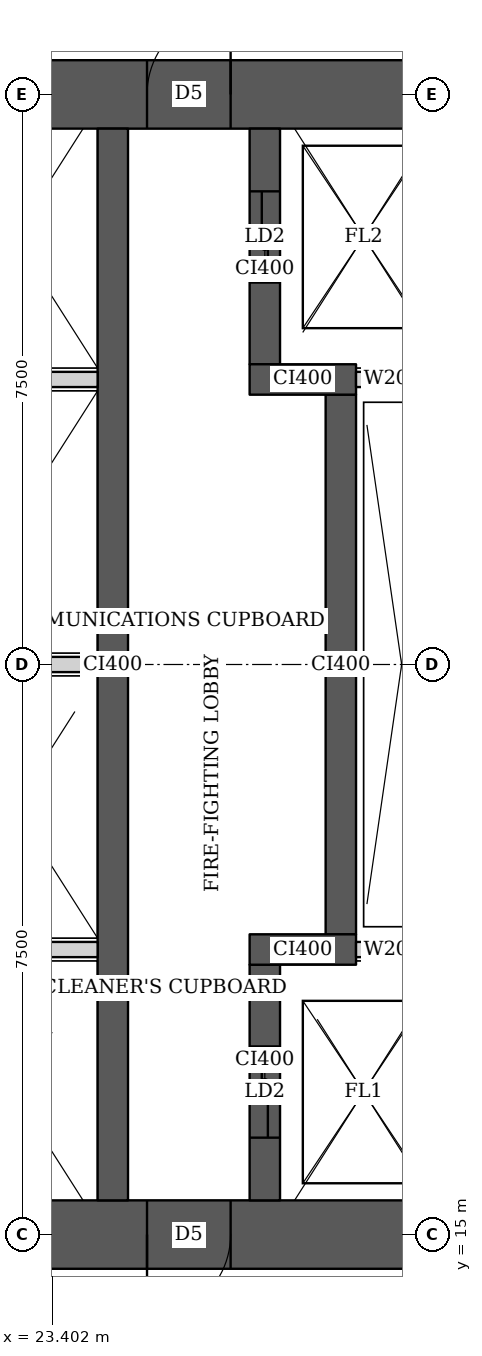
"""IFC4 building model, lengths in metres.
Left out: names, types, materials, properties, quantities, classifications, styles, units other than length and angle.
Written with IfcOpenShell. Run it as: python <this file> out.ifc"""

import sys

from ifc_helpers import new_model, si_unit, direction, frame, frame_2d, origin, place, context, subcontext, project, spatial, rectangle, extrude, element, fill, save


model = new_model("IFC4")
c1 = context("Model", 3, precision=1e-05, world=origin(), true_north=direction((0.0, 1.0)))
c2 = subcontext(c1, "Body", "Model", "MODEL_VIEW")
j1 = project(units=[si_unit("LENGTHUNIT", "METRE"), si_unit("PLANEANGLEUNIT", "RADIAN")], contexts=[c1])
p1 = place(None, origin())
s1 = spatial("IfcSite", under=j1, at=p1, CompositionType="ELEMENT")
p2 = place(p1, origin())
s2 = spatial("IfcBuilding", under=s1, at=p2, CompositionType="ELEMENT")
p3 = place(p2, frame((0.0, 0.0, 5.6)))
s3 = spatial("IfcBuildingStorey", under=s2, at=p3, CompositionType="ELEMENT", Elevation=5.6)
p4 = place(p3, frame((13.95, 15.0, 0.0), z_axis=(0.0, 0.0, 1.0), x_axis=(1.0, 0.0, 0.0)))
e1 = element("IfcWall", 1, at=p4, inside=s3, PredefinedType="SHEAR", context=c2, shape_type="SweptSolid", body=[
    extrude(rectangle(XDim=15.3, YDim=0.9, at=frame_2d((7.65, 0.0))), origin(), (0.0, 0.0, 1.0), 4.5),
])
p5 = place(p4, frame((4.45, 0.0, 0.0)))
e2 = element("IfcOpeningElement", 2, at=p5, cuts=e1, PredefinedType="OPENING", context=c2, shape_type="SweptSolid", body=[
    extrude(rectangle(XDim=1.8, YDim=2.1, at=frame_2d((0.9, 1.05))), frame((0.0, 0.46, 0.0), z_axis=(0.0, -1.0, 0.0), x_axis=(1.0, 0.0, 0.0)), (0.0, 0.0, 1.0), 0.92),
])
p6 = place(p4, frame((10.7, 0.0, 0.0)))
e3 = element("IfcOpeningElement", 3, at=p6, cuts=e1, PredefinedType="OPENING", context=c2, shape_type="SweptSolid", body=[
    extrude(rectangle(XDim=1.1, YDim=2.1, at=frame_2d((0.55, 1.05))), frame((0.0, 0.46, 0.0), z_axis=(0.0, -1.0, 0.0), x_axis=(1.0, 0.0, 0.0)), (0.0, 0.0, 1.0), 0.92),
])
p7 = place(p3, frame((13.95, 30.0, 0.0), z_axis=(0.0, 0.0, 1.0), x_axis=(1.0, 0.0, 0.0)))
e4 = element("IfcWall", 4, at=p7, inside=s3, PredefinedType="SHEAR", context=c2, shape_type="SweptSolid", body=[
    extrude(rectangle(XDim=15.3, YDim=0.9, at=frame_2d((7.65, 0.0))), origin(), (0.0, 0.0, 1.0), 4.5),
])
p8 = place(p7, frame((4.45, 0.0, 0.0)))
e5 = element("IfcOpeningElement", 5, at=p8, cuts=e4, PredefinedType="OPENING", context=c2, shape_type="SweptSolid", body=[
    extrude(rectangle(XDim=1.8, YDim=2.1, at=frame_2d((0.9, 1.05))), frame((0.0, 0.46, 0.0), z_axis=(0.0, -1.0, 0.0), x_axis=(1.0, 0.0, 0.0)), (0.0, 0.0, 1.0), 0.92),
])
p9 = place(p7, frame((10.7, 0.0, 0.0)))
e6 = element("IfcOpeningElement", 6, at=p9, cuts=e4, PredefinedType="OPENING", context=c2, shape_type="SweptSolid", body=[
    extrude(rectangle(XDim=1.1, YDim=2.1, at=frame_2d((0.55, 1.05))), frame((0.0, 0.46, 0.0), z_axis=(0.0, -1.0, 0.0), x_axis=(1.0, 0.0, 0.0)), (0.0, 0.0, 1.0), 0.92),
])
p10 = place(p3, frame((24.2, 15.45, 0.0), z_axis=(0.0, 0.0, 1.0), x_axis=(0.0, 1.0, 0.0)))
e7 = element("IfcWall", 7, at=p10, inside=s3, PredefinedType="SHEAR", context=c2, shape_type="SweptSolid", body=[
    extrude(rectangle(XDim=14.1, YDim=0.4, at=frame_2d((7.05, 0.0))), origin(), (0.0, 0.0, 1.0), 4.5),
])
p11 = place(p3, frame((26.2, 15.45, 0.0), z_axis=(0.0, 0.0, 1.0), x_axis=(0.0, 1.0, 0.0)))
e8 = element("IfcWall", 8, at=p11, inside=s3, PredefinedType="SHEAR", context=c2, shape_type="SweptSolid", body=[
    extrude(rectangle(XDim=3.1, YDim=0.4, at=frame_2d((1.55, 0.0))), origin(), (0.0, 0.0, 1.0), 4.5),
])
p12 = place(p11, frame((0.825, 0.0, 0.0)))
e9 = element("IfcOpeningElement", 9, at=p12, cuts=e8, PredefinedType="OPENING", context=c2, shape_type="SweptSolid", body=[
    extrude(rectangle(XDim=1.2, YDim=2.1, at=frame_2d((0.6, 1.05))), frame((0.0, 0.21, 0.0), z_axis=(0.0, -1.0, 0.0), x_axis=(1.0, 0.0, 0.0)), (0.0, 0.0, 1.0), 0.42),
])
p13 = place(p3, frame((26.0, 18.75, 0.0), z_axis=(0.0, 0.0, 1.0), x_axis=(1.0, 0.0, 0.0)))
e10 = element("IfcWall", 10, at=p13, inside=s3, PredefinedType="SHEAR", context=c2, shape_type="SweptSolid", body=[
    extrude(rectangle(XDim=1.4, YDim=0.4, at=frame_2d((0.7, 0.0))), origin(), (0.0, 0.0, 1.0), 4.5),
])
p14 = place(p3, frame((27.2, 18.95, 0.0), z_axis=(0.0, 0.0, 1.0), x_axis=(0.0, 1.0, 0.0)))
e11 = element("IfcWall", 11, at=p14, inside=s3, PredefinedType="SHEAR", context=c2, shape_type="SweptSolid", body=[
    extrude(rectangle(XDim=7.1, YDim=0.4, at=frame_2d((3.55, 0.0))), origin(), (0.0, 0.0, 1.0), 4.5),
])
p15 = place(p3, frame((26.0, 26.25, 0.0), z_axis=(0.0, 0.0, 1.0), x_axis=(1.0, 0.0, 0.0)))
e12 = element("IfcWall", 12, at=p15, inside=s3, PredefinedType="SHEAR", context=c2, shape_type="SweptSolid", body=[
    extrude(rectangle(XDim=1.4, YDim=0.4, at=frame_2d((0.7, 0.0))), origin(), (0.0, 0.0, 1.0), 4.5),
])
p16 = place(p3, frame((26.2, 26.45, 0.0), z_axis=(0.0, 0.0, 1.0), x_axis=(0.0, 1.0, 0.0)))
e13 = element("IfcWall", 13, at=p16, inside=s3, PredefinedType="SHEAR", context=c2, shape_type="SweptSolid", body=[
    extrude(rectangle(XDim=3.1, YDim=0.4, at=frame_2d((1.55, 0.0))), origin(), (0.0, 0.0, 1.0), 4.5),
])
p17 = place(p16, frame((1.075, 0.0, 0.0)))
e14 = element("IfcOpeningElement", 14, at=p17, cuts=e13, PredefinedType="OPENING", context=c2, shape_type="SweptSolid", body=[
    extrude(rectangle(XDim=1.2, YDim=2.1, at=frame_2d((0.6, 1.05))), frame((0.0, 0.21, 0.0), z_axis=(0.0, -1.0, 0.0), x_axis=(1.0, 0.0, 0.0)), (0.0, 0.0, 1.0), 0.42),
])
for number, where, z_axis, x_axis in (
    (15, (21.8, 18.75, 0.0), (0.0, 0.0, 1.0), (1.0, 0.0, 0.0)),
    (16, (21.8, 22.5, 0.0), (0.0, 0.0, 1.0), (1.0, 0.0, 0.0)),
    (17, (21.8, 26.25, 0.0), (0.0, 0.0, 1.0), (1.0, 0.0, 0.0)),
):
    element("IfcWall", number, at=place(p3, frame(where, z_axis=z_axis, x_axis=x_axis)), inside=s3, PredefinedType="SOLIDWALL", context=c2, shape_type="SweptSolid", body=[
        extrude(rectangle(XDim=2.2, YDim=0.2, at=frame_2d((1.1, 0.0))), origin(), (0.0, 0.0, 1.0), 4.2),
    ])
for number, where, z_axis, x_axis in (
    (18, (27.4, 18.75, 0.0), (0.0, 0.0, 1.0), (1.0, 0.0, 0.0)),
    (19, (27.4, 26.25, 0.0), (0.0, 0.0, 1.0), (1.0, 0.0, 0.0)),
):
    element("IfcWall", number, at=place(p3, frame(where, z_axis=z_axis, x_axis=x_axis)), inside=s3, PredefinedType="SOLIDWALL", context=c2, shape_type="SweptSolid", body=[
        extrude(rectangle(XDim=0.95, YDim=0.2, at=frame_2d((0.475, 0.0))), origin(), (0.0, 0.0, 1.0), 4.2),
    ])
p18 = place(p6, origin())
e20 = element("IfcDoor", 20, at=p18, inside=s3, OperationType="SINGLE_SWING_RIGHT", PredefinedType="DOOR", context=c2, shape_type="SweptSolid", body=[
    extrude(rectangle(XDim=1.1, YDim=2.1, at=frame_2d((0.55, 1.05))), frame((0.0, 0.025, 0.0), z_axis=(0.0, -1.0, 0.0), x_axis=(1.0, 0.0, 0.0)), (0.0, 0.0, 1.0), 0.05),
])
fill(e3, e20)
p19 = place(p9, origin())
e21 = element("IfcDoor", 21, at=p19, inside=s3, OperationType="SINGLE_SWING_RIGHT", PredefinedType="DOOR", context=c2, shape_type="SweptSolid", body=[
    extrude(rectangle(XDim=1.1, YDim=2.1, at=frame_2d((0.55, 1.05))), frame((0.0, 0.025, 0.0), z_axis=(0.0, -1.0, 0.0), x_axis=(1.0, 0.0, 0.0)), (0.0, 0.0, 1.0), 0.05),
])
fill(e6, e21)
p20 = place(p12, origin())
e22 = element("IfcDoor", 22, at=p20, inside=s3, OperationType="DOUBLE_DOOR_SLIDING", PredefinedType="DOOR", context=c2, shape_type="SweptSolid", body=[
    extrude(rectangle(XDim=1.2, YDim=2.1, at=frame_2d((0.6, 1.05))), frame((0.0, 0.025, 0.0), z_axis=(0.0, -1.0, 0.0), x_axis=(1.0, 0.0, 0.0)), (0.0, 0.0, 1.0), 0.05),
])
fill(e9, e22)
p21 = place(p17, origin())
e23 = element("IfcDoor", 23, at=p21, inside=s3, OperationType="DOUBLE_DOOR_SLIDING", PredefinedType="DOOR", context=c2, shape_type="SweptSolid", body=[
    extrude(rectangle(XDim=1.2, YDim=2.1, at=frame_2d((0.6, 1.05))), frame((0.0, 0.025, 0.0), z_axis=(0.0, -1.0, 0.0), x_axis=(1.0, 0.0, 0.0)), (0.0, 0.0, 1.0), 0.05),
])
fill(e14, e23)
save(model, sys.argv[1])
